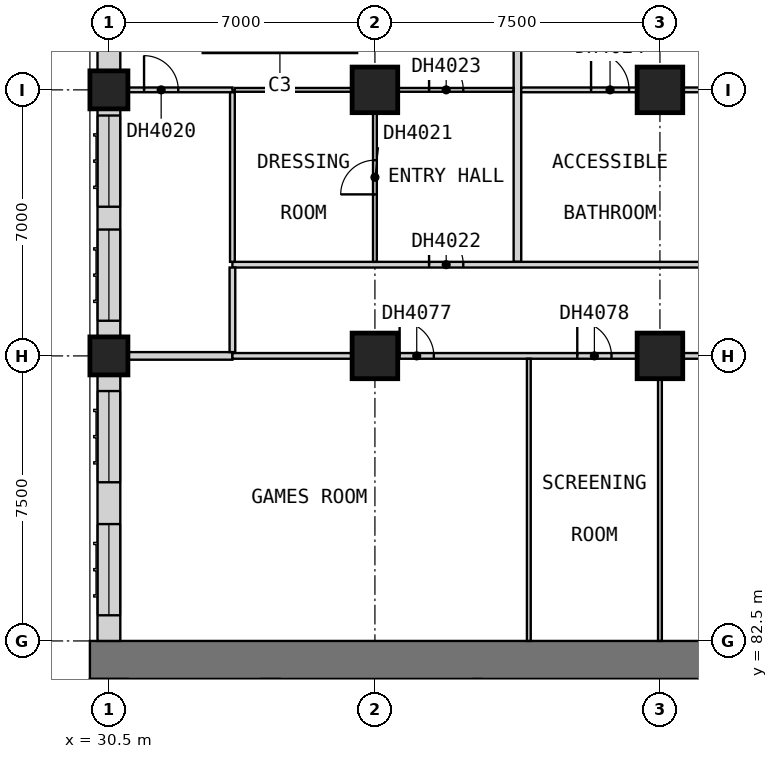
"""IFC4 building model, lengths in metres.
Left out: names, types, materials, properties, quantities, classifications, styles, units other than length and angle.
Written with IfcOpenShell. Run it as: python <this file> out.ifc"""

import sys

from ifc_helpers import new_model, si_unit, direction, frame, frame_2d, origin, origin_2d, place, context, subcontext, project, spatial, rectangle, extrude, element, fill, save


model = new_model("IFC4")
c1 = context("Model", 3, precision=1e-05, world=origin(), true_north=direction((0.0, 1.0)))
c2 = subcontext(c1, "Body", "Model", "MODEL_VIEW")
j1 = project(units=[si_unit("LENGTHUNIT", "METRE"), si_unit("PLANEANGLEUNIT", "RADIAN")], contexts=[c1])
p1 = place(None, origin())
s1 = spatial("IfcSite", under=j1, at=p1, CompositionType="ELEMENT")
p2 = place(p1, origin())
s2 = spatial("IfcBuilding", under=s1, at=p2, CompositionType="ELEMENT")
p3 = place(p2, frame((0.0, 0.0, 44.8)))
s3 = spatial("IfcBuildingStorey", under=s2, at=p3, CompositionType="ELEMENT", Elevation=44.8)
for number, where, z_axis, x_axis in (
    (1, (30.5, 90.0, 0.0), (0.0, 0.0, 1.0), (1.0, 0.0, 0.0)),
    (2, (30.5, 97.0, 0.0), (0.0, 0.0, 1.0), (1.0, 0.0, 0.0)),
):
    element("IfcColumn", number, at=place(p3, frame(where, z_axis=z_axis, x_axis=x_axis)), inside=s3, PredefinedType="COLUMN", context=c2, shape_type="SweptSolid", body=[
        extrude(rectangle(XDim=1.0, YDim=1.0, at=origin_2d()), origin(), (0.0, 0.0, 1.0), 3.6),
    ])
for number, where, z_axis, x_axis in (
    (3, (37.5, 90.0, 0.0), (0.0, 0.0, 1.0), (1.0, 0.0, 0.0)),
    (4, (37.5, 97.0, 0.0), (0.0, 0.0, 1.0), (1.0, 0.0, 0.0)),
    (5, (45.0, 90.0, 0.0), (0.0, 0.0, 1.0), (1.0, 0.0, 0.0)),
    (6, (45.0, 97.0, 0.0), (0.0, 0.0, 1.0), (1.0, 0.0, 0.0)),
):
    element("IfcColumn", number, at=place(p3, frame(where, z_axis=z_axis, x_axis=x_axis)), inside=s3, PredefinedType="COLUMN", context=c2, shape_type="SweptSolid", body=[
        extrude(rectangle(XDim=1.2, YDim=1.2, at=origin_2d()), origin(), (0.0, 0.0, 1.0), 3.6),
    ])
p4 = place(p3, frame((30.0, 82.0, 0.0), z_axis=(0.0, 0.0, 1.0), x_axis=(1.0, 0.0, 0.0)))
e7 = element("IfcWall", 7, at=p4, inside=s3, PredefinedType="SHEAR", context=c2, shape_type="SweptSolid", body=[
    extrude(rectangle(XDim=30.0, YDim=1.0, at=frame_2d((15.0, 0.0))), origin(), (0.0, 0.0, 1.0), 3.6),
])
p5 = place(p3, frame((34.75, 78.3, 0.0), z_axis=(0.0, 0.0, 1.0), x_axis=(0.0, 1.0, 0.0)))
e8 = element("IfcWall", 8, at=p5, inside=s3, PredefinedType="SHEAR", context=c2, shape_type="SweptSolid", body=[
    extrude(rectangle(XDim=3.2, YDim=0.5, at=frame_2d((1.6, 0.0))), origin(), (0.0, 0.0, 1.0), 3.6),
])
p6 = place(p3, frame((30.5, 102.0, 0.0), z_axis=(0.0, 0.0, 1.0), x_axis=(0.0, -1.0, 0.0)))
e9 = element("IfcWall", 9, at=p6, inside=s3, PredefinedType="SOLIDWALL", context=c2, shape_type="SweptSolid", body=[
    extrude(rectangle(XDim=4.5, YDim=0.6, at=frame_2d((2.25, 0.0))), origin(), (0.0, 0.0, 1.0), 3.35),
])
p7 = place(p6, frame((1.5, 0.0, 0.8)))
e10 = element("IfcOpeningElement", 10, at=p7, cuts=e9, PredefinedType="OPENING", context=c2, shape_type="SweptSolid", body=[
    extrude(rectangle(XDim=2.4, YDim=1.8, at=frame_2d((1.2, 0.9))), frame((0.0, 0.31, 0.0), z_axis=(0.0, -1.0, 0.0), x_axis=(1.0, 0.0, 0.0)), (0.0, 0.0, 1.0), 0.62),
])
p8 = place(p3, frame((30.5, 96.5, 0.0), z_axis=(0.0, 0.0, 1.0), x_axis=(0.0, -1.0, 0.0)))
e11 = element("IfcWall", 11, at=p8, inside=s3, PredefinedType="SOLIDWALL", context=c2, shape_type="SweptSolid", body=[
    extrude(rectangle(XDim=6.0, YDim=0.6, at=frame_2d((3.0, 0.0))), origin(), (0.0, 0.0, 1.0), 2.85),
])
p9 = place(p8, frame((3.175, 0.0, 0.8)))
e12 = element("IfcOpeningElement", 12, at=p9, cuts=e11, PredefinedType="OPENING", context=c2, shape_type="SweptSolid", body=[
    extrude(rectangle(XDim=2.4, YDim=1.8, at=frame_2d((1.2, 0.9))), frame((0.0, 0.31, 0.0), z_axis=(0.0, -1.0, 0.0), x_axis=(1.0, 0.0, 0.0)), (0.0, 0.0, 1.0), 0.62),
])
p10 = place(p8, frame((0.175, 0.0, 0.8)))
e13 = element("IfcOpeningElement", 13, at=p10, cuts=e11, PredefinedType="OPENING", context=c2, shape_type="SweptSolid", body=[
    extrude(rectangle(XDim=2.4, YDim=1.8, at=frame_2d((1.2, 0.9))), frame((0.0, 0.31, 0.0), z_axis=(0.0, -1.0, 0.0), x_axis=(1.0, 0.0, 0.0)), (0.0, 0.0, 1.0), 0.62),
])
p11 = place(p3, frame((30.5, 89.5, 0.0), z_axis=(0.0, 0.0, 1.0), x_axis=(0.0, -1.0, 0.0)))
e14 = element("IfcWall", 14, at=p11, inside=s3, PredefinedType="SOLIDWALL", context=c2, shape_type="SweptSolid", body=[
    extrude(rectangle(XDim=7.0, YDim=0.6, at=frame_2d((3.5, 0.0))), origin(), (0.0, 0.0, 1.0), 3.35),
])
p12 = place(p11, frame((3.925, 0.0, 0.8)))
e15 = element("IfcOpeningElement", 15, at=p12, cuts=e14, PredefinedType="OPENING", context=c2, shape_type="SweptSolid", body=[
    extrude(rectangle(XDim=2.4, YDim=1.8, at=frame_2d((1.2, 0.9))), frame((0.0, 0.31, 0.0), z_axis=(0.0, -1.0, 0.0), x_axis=(1.0, 0.0, 0.0)), (0.0, 0.0, 1.0), 0.62),
])
p13 = place(p11, frame((0.425, 0.0, 0.8)))
e16 = element("IfcOpeningElement", 16, at=p13, cuts=e14, PredefinedType="OPENING", context=c2, shape_type="SweptSolid", body=[
    extrude(rectangle(XDim=2.4, YDim=1.8, at=frame_2d((1.2, 0.9))), frame((0.0, 0.31, 0.0), z_axis=(0.0, -1.0, 0.0), x_axis=(1.0, 0.0, 0.0)), (0.0, 0.0, 1.0), 0.62),
])
p14 = place(p3, frame((30.0, 90.0, 0.0), z_axis=(0.0, 0.0, 1.0), x_axis=(1.0, 0.0, 0.0)))
e17 = element("IfcWall", 17, at=p14, inside=s3, PredefinedType="PARTITIONING", context=c2, shape_type="SweptSolid", body=[
    extrude(rectangle(XDim=3.75, YDim=0.2, at=frame_2d((1.875, 0.0))), origin(), (0.0, 0.0, 1.0), 3.35),
])
p15 = place(p3, frame((41.25, 92.475, 0.0), z_axis=(0.0, 0.0, 1.0), x_axis=(0.0, 1.0, 0.0)))
e18 = element("IfcWall", 18, at=p15, inside=s3, PredefinedType="PARTITIONING", context=c2, shape_type="SweptSolid", body=[
    extrude(rectangle(XDim=11.715, YDim=0.2, at=frame_2d((5.857, 0.0))), origin(), (0.0, 0.0, 1.0), 3.35),
])
p16 = place(p3, frame((33.75, 90.0, 0.0), z_axis=(0.0, 0.0, 1.0), x_axis=(1.0, 0.0, 0.0)))
e19 = element("IfcWall", 19, at=p16, inside=s3, PredefinedType="PARTITIONING", context=c2, shape_type="SweptSolid", body=[
    extrude(rectangle(XDim=41.25, YDim=0.15, at=frame_2d((20.625, 0.0))), origin(), (0.0, 0.0, 1.0), 3.35),
])
p17 = place(p16, frame((4.4, 0.0, 0.0)))
e20 = element("IfcOpeningElement", 20, at=p17, cuts=e19, PredefinedType="OPENING", context=c2, shape_type="SweptSolid", body=[
    extrude(rectangle(XDim=0.9, YDim=2.1, at=frame_2d((0.45, 1.05))), frame((0.0, 0.085, 0.0), z_axis=(0.0, -1.0, 0.0), x_axis=(1.0, 0.0, 0.0)), (0.0, 0.0, 1.0), 0.17),
])
p18 = place(p16, frame((9.075, 0.0, 0.0)))
e21 = element("IfcOpeningElement", 21, at=p18, cuts=e19, PredefinedType="OPENING", context=c2, shape_type="SweptSolid", body=[
    extrude(rectangle(XDim=0.9, YDim=2.1, at=frame_2d((0.45, 1.05))), frame((0.0, 0.085, 0.0), z_axis=(0.0, -1.0, 0.0), x_axis=(1.0, 0.0, 0.0)), (0.0, 0.0, 1.0), 0.17),
])
p19 = place(p16, frame((16.725, 0.0, 0.0)))
e22 = element("IfcOpeningElement", 22, at=p19, cuts=e19, PredefinedType="OPENING", context=c2, shape_type="SweptSolid", body=[
    extrude(rectangle(XDim=0.9, YDim=2.1, at=frame_2d((0.45, 1.05))), frame((0.0, 0.085, 0.0), z_axis=(0.0, -1.0, 0.0), x_axis=(1.0, 0.0, 0.0)), (0.0, 0.0, 1.0), 0.17),
])
p20 = place(p3, frame((33.75, 92.4, 0.0), z_axis=(0.0, 0.0, 1.0), x_axis=(1.0, 0.0, 0.0)))
e23 = element("IfcWall", 23, at=p20, inside=s3, PredefinedType="PARTITIONING", context=c2, shape_type="SweptSolid", body=[
    extrude(rectangle(XDim=43.65, YDim=0.15, at=frame_2d((21.825, 0.0))), origin(), (0.0, 0.0, 1.0), 3.35),
])
p21 = place(p20, frame((5.175, 0.0, 0.0)))
e24 = element("IfcOpeningElement", 24, at=p21, cuts=e23, PredefinedType="OPENING", context=c2, shape_type="SweptSolid", body=[
    extrude(rectangle(XDim=0.9, YDim=2.1, at=frame_2d((0.45, 1.05))), frame((0.0, 0.085, 0.0), z_axis=(0.0, -1.0, 0.0), x_axis=(1.0, 0.0, 0.0)), (0.0, 0.0, 1.0), 0.17),
])
p22 = place(p20, frame((13.188, 0.0, 0.0)))
e25 = element("IfcOpeningElement", 25, at=p22, cuts=e23, PredefinedType="OPENING", context=c2, shape_type="SweptSolid", body=[
    extrude(rectangle(XDim=1.0, YDim=2.1, at=frame_2d((0.5, 1.05))), frame((0.0, 0.085, 0.0), z_axis=(0.0, -1.0, 0.0), x_axis=(1.0, 0.0, 0.0)), (0.0, 0.0, 1.0), 0.17),
])
p23 = place(p20, frame((20.55, 0.0, 0.0)))
e26 = element("IfcOpeningElement", 26, at=p23, cuts=e23, PredefinedType="OPENING", context=c2, shape_type="SweptSolid", body=[
    extrude(rectangle(XDim=0.9, YDim=2.1, at=frame_2d((0.45, 1.05))), frame((0.0, 0.085, 0.0), z_axis=(0.0, -1.0, 0.0), x_axis=(1.0, 0.0, 0.0)), (0.0, 0.0, 1.0), 0.17),
])
p24 = place(p20, frame((24.863, 0.0, 0.0)))
e27 = element("IfcOpeningElement", 27, at=p24, cuts=e23, PredefinedType="OPENING", context=c2, shape_type="SweptSolid", body=[
    extrude(rectangle(XDim=0.9, YDim=2.1, at=frame_2d((0.45, 1.05))), frame((0.0, 0.085, 0.0), z_axis=(0.0, -1.0, 0.0), x_axis=(1.0, 0.0, 0.0)), (0.0, 0.0, 1.0), 0.17),
])
p25 = place(p20, frame((31.8, 0.0, 0.0)))
e28 = element("IfcOpeningElement", 28, at=p25, cuts=e23, PredefinedType="OPENING", context=c2, shape_type="SweptSolid", body=[
    extrude(rectangle(XDim=0.9, YDim=2.1, at=frame_2d((0.45, 1.05))), frame((0.0, 0.085, 0.0), z_axis=(0.0, -1.0, 0.0), x_axis=(1.0, 0.0, 0.0)), (0.0, 0.0, 1.0), 0.17),
])
p26 = place(p20, frame((39.3, 0.0, 0.0)))
e29 = element("IfcOpeningElement", 29, at=p26, cuts=e23, PredefinedType="OPENING", context=c2, shape_type="SweptSolid", body=[
    extrude(rectangle(XDim=0.9, YDim=2.1, at=frame_2d((0.45, 1.05))), frame((0.0, 0.085, 0.0), z_axis=(0.0, -1.0, 0.0), x_axis=(1.0, 0.0, 0.0)), (0.0, 0.0, 1.0), 0.17),
])
p27 = place(p20, frame((42.0, 0.0, 0.0)))
e30 = element("IfcOpeningElement", 30, at=p27, cuts=e23, PredefinedType="OPENING", context=c2, shape_type="SweptSolid", body=[
    extrude(rectangle(XDim=0.9, YDim=2.1, at=frame_2d((0.45, 1.05))), frame((0.0, 0.085, 0.0), z_axis=(0.0, -1.0, 0.0), x_axis=(1.0, 0.0, 0.0)), (0.0, 0.0, 1.0), 0.17),
])
p28 = place(p3, frame((33.75, 90.1, 0.0), z_axis=(0.0, 0.0, 1.0), x_axis=(0.0, 1.0, 0.0)))
e31 = element("IfcWall", 31, at=p28, inside=s3, PredefinedType="PARTITIONING", context=c2, shape_type="SweptSolid", body=[
    extrude(rectangle(XDim=2.225, YDim=0.15, at=frame_2d((1.112, 0.0))), origin(), (0.0, 0.0, 1.0), 3.35),
])
p29 = place(p3, frame((33.812, 97.0, 0.0), z_axis=(0.0, 0.0, 1.0), x_axis=(1.0, 0.0, 0.0)))
e32 = element("IfcWall", 32, at=p29, inside=s3, PredefinedType="PARTITIONING", context=c2, shape_type="SweptSolid", body=[
    extrude(rectangle(XDim=7.337, YDim=0.1, at=frame_2d((3.669, 0.0))), origin(), (0.0, 0.0, 1.0), 3.35),
])
p30 = place(p29, frame((5.113, 0.0, 0.0)))
e33 = element("IfcOpeningElement", 33, at=p30, cuts=e32, PredefinedType="OPENING", context=c2, shape_type="SweptSolid", body=[
    extrude(rectangle(XDim=0.9, YDim=2.1, at=frame_2d((0.45, 1.05))), frame((0.0, 0.06, 0.0), z_axis=(0.0, -1.0, 0.0), x_axis=(1.0, 0.0, 0.0)), (0.0, 0.0, 1.0), 0.12),
])
p31 = place(p3, frame((37.5, 92.475, 0.0), z_axis=(0.0, 0.0, 1.0), x_axis=(0.0, 1.0, 0.0)))
e34 = element("IfcWall", 34, at=p31, inside=s3, PredefinedType="PARTITIONING", context=c2, shape_type="SweptSolid", body=[
    extrude(rectangle(XDim=4.475, YDim=0.1, at=frame_2d((2.237, 0.0))), origin(), (0.0, 0.0, 1.0), 3.35),
])
p32 = place(p31, frame((1.775, 0.0, 0.0)))
e35 = element("IfcOpeningElement", 35, at=p32, cuts=e34, PredefinedType="OPENING", context=c2, shape_type="SweptSolid", body=[
    extrude(rectangle(XDim=0.9, YDim=2.1, at=frame_2d((0.45, 1.05))), frame((0.0, 0.06, 0.0), z_axis=(0.0, -1.0, 0.0), x_axis=(1.0, 0.0, 0.0)), (0.0, 0.0, 1.0), 0.12),
])
for number, where, z_axis, x_axis in (
    (36, (41.55, 82.5, 0.0), (0.0, 0.0, 1.0), (0.0, 1.0, 0.0)),
    (37, (45.0, 82.5, 0.0), (0.0, 0.0, 1.0), (0.0, 1.0, 0.0)),
):
    element("IfcWall", number, at=place(p3, frame(where, z_axis=z_axis, x_axis=x_axis)), inside=s3, PredefinedType="PARTITIONING", context=c2, shape_type="SweptSolid", body=[
        extrude(rectangle(XDim=7.425, YDim=0.1, at=frame_2d((3.712, 0.0))), origin(), (0.0, 0.0, 1.0), 3.35),
    ])
p33 = place(p3, frame((30.0, 97.0, 0.0), z_axis=(0.0, 0.0, 1.0), x_axis=(1.0, 0.0, 0.0)))
e38 = element("IfcWall", 38, at=p33, inside=s3, PredefinedType="PARTITIONING", context=c2, shape_type="SweptSolid", body=[
    extrude(rectangle(XDim=3.75, YDim=0.125, at=frame_2d((1.875, 0.0))), origin(), (0.0, 0.0, 1.0), 3.35),
])
p34 = place(p33, frame((1.425, 0.0, 0.0)))
e39 = element("IfcOpeningElement", 39, at=p34, cuts=e38, PredefinedType="OPENING", context=c2, shape_type="SweptSolid", body=[
    extrude(rectangle(XDim=0.9, YDim=2.1, at=frame_2d((0.45, 1.05))), frame((0.0, 0.073, 0.0), z_axis=(0.0, -1.0, 0.0), x_axis=(1.0, 0.0, 0.0)), (0.0, 0.0, 1.0), 0.145),
])
p35 = place(p3, frame((41.35, 97.0, 0.0), z_axis=(0.0, 0.0, 1.0), x_axis=(1.0, 0.0, 0.0)))
e40 = element("IfcWall", 40, at=p35, inside=s3, PredefinedType="PARTITIONING", context=c2, shape_type="SweptSolid", body=[
    extrude(rectangle(XDim=4.775, YDim=0.125, at=frame_2d((2.387, 0.0))), origin(), (0.0, 0.0, 1.0), 3.35),
])
p36 = place(p35, frame((1.837, 0.0, 0.0)))
e41 = element("IfcOpeningElement", 41, at=p36, cuts=e40, PredefinedType="OPENING", context=c2, shape_type="SweptSolid", body=[
    extrude(rectangle(XDim=1.0, YDim=2.1, at=frame_2d((0.5, 1.05))), frame((0.0, 0.073, 0.0), z_axis=(0.0, -1.0, 0.0), x_axis=(1.0, 0.0, 0.0)), (0.0, 0.0, 1.0), 0.145),
])
p37 = place(p3, frame((33.75, 92.475, 0.0), z_axis=(0.0, 0.0, 1.0), x_axis=(0.0, 1.0, 0.0)))
e42 = element("IfcWall", 42, at=p37, inside=s3, PredefinedType="PARTITIONING", context=c2, shape_type="SweptSolid", body=[
    extrude(rectangle(XDim=4.462, YDim=0.125, at=frame_2d((2.231, 0.0))), origin(), (0.0, 0.0, 1.0), 3.35),
])
p38 = place(p9, origin())
e43 = element("IfcWindow", 43, at=p38, inside=s3, PartitioningType="SINGLE_PANEL", PredefinedType="WINDOW", context=c2, shape_type="SweptSolid", body=[
    extrude(rectangle(XDim=2.4, YDim=1.8, at=frame_2d((1.2, 0.9))), frame((0.0, -0.07, 0.0), z_axis=(0.0, -1.0, 0.0), x_axis=(1.0, 0.0, 0.0)), (0.0, 0.0, 1.0), 0.06),
])
fill(e12, e43)
p39 = place(p10, origin())
e44 = element("IfcWindow", 44, at=p39, inside=s3, PartitioningType="SINGLE_PANEL", PredefinedType="WINDOW", context=c2, shape_type="SweptSolid", body=[
    extrude(rectangle(XDim=2.4, YDim=1.8, at=frame_2d((1.2, 0.9))), frame((0.0, -0.07, 0.0), z_axis=(0.0, -1.0, 0.0), x_axis=(1.0, 0.0, 0.0)), (0.0, 0.0, 1.0), 0.06),
])
fill(e13, e44)
p40 = place(p12, origin())
e45 = element("IfcWindow", 45, at=p40, inside=s3, PartitioningType="SINGLE_PANEL", PredefinedType="WINDOW", context=c2, shape_type="SweptSolid", body=[
    extrude(rectangle(XDim=2.4, YDim=1.8, at=frame_2d((1.2, 0.9))), frame((0.0, -0.07, 0.0), z_axis=(0.0, -1.0, 0.0), x_axis=(1.0, 0.0, 0.0)), (0.0, 0.0, 1.0), 0.06),
])
fill(e15, e45)
p41 = place(p13, origin())
e46 = element("IfcWindow", 46, at=p41, inside=s3, PartitioningType="SINGLE_PANEL", PredefinedType="WINDOW", context=c2, shape_type="SweptSolid", body=[
    extrude(rectangle(XDim=2.4, YDim=1.8, at=frame_2d((1.2, 0.9))), frame((0.0, -0.07, 0.0), z_axis=(0.0, -1.0, 0.0), x_axis=(1.0, 0.0, 0.0)), (0.0, 0.0, 1.0), 0.06),
])
fill(e16, e46)
p42 = place(p34, origin())
e47 = element("IfcDoor", 47, at=p42, inside=s3, OperationType="SINGLE_SWING_RIGHT", PredefinedType="DOOR", context=c2, shape_type="SweptSolid", body=[
    extrude(rectangle(XDim=0.9, YDim=2.1, at=frame_2d((0.45, 1.05))), frame((0.0, 0.025, 0.0), z_axis=(0.0, -1.0, 0.0), x_axis=(1.0, 0.0, 0.0)), (0.0, 0.0, 1.0), 0.05),
])
fill(e39, e47)
p43 = place(p32, origin())
e48 = element("IfcDoor", 48, at=p43, inside=s3, OperationType="SINGLE_SWING_RIGHT", PredefinedType="DOOR", context=c2, shape_type="SweptSolid", body=[
    extrude(rectangle(XDim=0.9, YDim=2.1, at=frame_2d((0.45, 1.05))), frame((0.0, 0.025, 0.0), z_axis=(0.0, -1.0, 0.0), x_axis=(1.0, 0.0, 0.0)), (0.0, 0.0, 1.0), 0.05),
])
fill(e35, e48)
p44 = place(p21, origin())
e49 = element("IfcDoor", 49, at=p44, inside=s3, OperationType="SINGLE_SWING_LEFT", PredefinedType="DOOR", context=c2, shape_type="SweptSolid", body=[
    extrude(rectangle(XDim=0.9, YDim=2.1, at=frame_2d((0.45, 1.05))), frame((0.0, 0.025, 0.0), z_axis=(0.0, -1.0, 0.0), x_axis=(1.0, 0.0, 0.0)), (0.0, 0.0, 1.0), 0.05),
])
fill(e24, e49)
p45 = place(p30, origin())
e50 = element("IfcDoor", 50, at=p45, inside=s3, OperationType="SINGLE_SWING_RIGHT", PredefinedType="DOOR", context=c2, shape_type="SweptSolid", body=[
    extrude(rectangle(XDim=0.9, YDim=2.1, at=frame_2d((0.45, 1.05))), frame((0.0, 0.025, 0.0), z_axis=(0.0, -1.0, 0.0), x_axis=(1.0, 0.0, 0.0)), (0.0, 0.0, 1.0), 0.05),
])
fill(e33, e50)
p46 = place(p36, origin())
e51 = element("IfcDoor", 51, at=p46, inside=s3, OperationType="SINGLE_SWING_RIGHT", PredefinedType="DOOR", context=c2, shape_type="SweptSolid", body=[
    extrude(rectangle(XDim=1.0, YDim=2.1, at=frame_2d((0.5, 1.05))), frame((0.0, 0.025, 0.0), z_axis=(0.0, -1.0, 0.0), x_axis=(1.0, 0.0, 0.0)), (0.0, 0.0, 1.0), 0.05),
])
fill(e41, e51)
p47 = place(p17, origin())
e52 = element("IfcDoor", 52, at=p47, inside=s3, OperationType="SINGLE_SWING_LEFT", PredefinedType="DOOR", context=c2, shape_type="SweptSolid", body=[
    extrude(rectangle(XDim=0.9, YDim=2.1, at=frame_2d((0.45, 1.05))), frame((0.0, 0.025, 0.0), z_axis=(0.0, -1.0, 0.0), x_axis=(1.0, 0.0, 0.0)), (0.0, 0.0, 1.0), 0.05),
])
fill(e20, e52)
p48 = place(p18, origin())
e53 = element("IfcDoor", 53, at=p48, inside=s3, OperationType="SINGLE_SWING_RIGHT", PredefinedType="DOOR", context=c2, shape_type="SweptSolid", body=[
    extrude(rectangle(XDim=0.9, YDim=2.1, at=frame_2d((0.45, 1.05))), frame((0.0, 0.025, 0.0), z_axis=(0.0, -1.0, 0.0), x_axis=(1.0, 0.0, 0.0)), (0.0, 0.0, 1.0), 0.05),
])
fill(e21, e53)
save(model, sys.argv[1])
